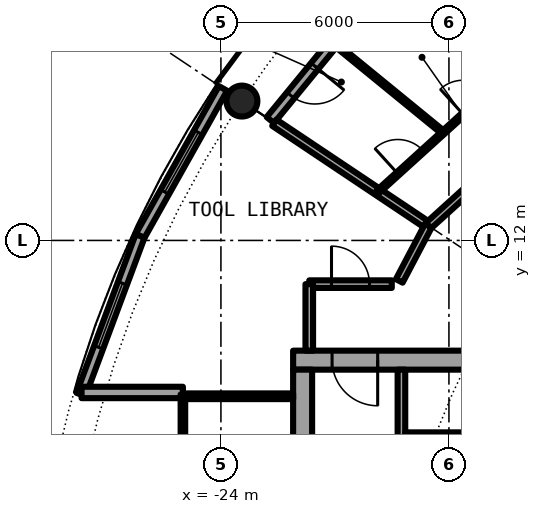
"""IFC4 building model, lengths in metres.
Left out: names, types, materials, properties, quantities, classifications, styles, units other than length and angle.
Written with IfcOpenShell. Run it as: python <this file> out.ifc"""

import sys

from ifc_helpers import new_model, si_unit, direction, frame, frame_2d, origin, origin_2d, place, context, subcontext, project, spatial, rectangle, hollow_circle, extrude, element, fill, save


model = new_model("IFC4")
c1 = context("Model", 3, precision=1e-05, world=origin(), true_north=direction((0.0, 1.0)))
c2 = subcontext(c1, "Body", "Model", "MODEL_VIEW")
j1 = project(units=[si_unit("LENGTHUNIT", "METRE"), si_unit("PLANEANGLEUNIT", "RADIAN")], contexts=[c1])
p1 = place(None, origin())
s1 = spatial("IfcSite", under=j1, at=p1, CompositionType="ELEMENT")
p2 = place(p1, origin())
s2 = spatial("IfcBuilding", under=s1, at=p2, CompositionType="ELEMENT")
p3 = place(p2, frame((0.0, 0.0, 151.3)))
s3 = spatial("IfcBuildingStorey", under=s2, at=p3, CompositionType="ELEMENT", Elevation=151.3)
p4 = place(p3, frame((-23.448, 15.667, 0.0), z_axis=(0.0, 0.0, 1.0), x_axis=(1.0, 0.0, 0.0)))
e1 = element("IfcColumn", 1, at=p4, inside=s3, PredefinedType="COLUMN", context=c2, shape_type="SweptSolid", body=[
    extrude(hollow_circle(Radius=0.406, WallThickness=0.04, at=origin_2d()), origin(), (0.0, 0.0, 1.0), 3.05),
])
p5 = place(p3, frame((-19.304, 19.304, 0.0), z_axis=(0.0, 0.0, 1.0), x_axis=(-0.634382322723, -0.773019449054, 0.0)))
e2 = element("IfcWall", 2, at=p5, inside=s3, PredefinedType="SOLIDWALL", context=c2, shape_type="SweptSolid", body=[
    extrude(rectangle(XDim=5.352, YDim=0.25, at=frame_2d((2.676, 0.0))), origin(), (0.0, 0.0, 1.0), 2.7),
])
p6 = place(p5, frame((0.441, 0.0, 0.3)))
e3 = element("IfcOpeningElement", 3, at=p6, cuts=e2, PredefinedType="OPENING", context=c2, shape_type="SweptSolid", body=[
    extrude(rectangle(XDim=1.8, YDim=2.1, at=frame_2d((0.9, 1.05))), frame((0.0, 0.135, 0.0), z_axis=(0.0, -1.0, 0.0), x_axis=(1.0, 0.0, 0.0)), (0.0, 0.0, 1.0), 0.27),
])
p7 = place(p5, frame((3.51, 0.0, 0.0)))
e4 = element("IfcOpeningElement", 4, at=p7, cuts=e2, PredefinedType="OPENING", context=c2, shape_type="SweptSolid", body=[
    extrude(rectangle(XDim=1.0, YDim=2.2, at=frame_2d((0.5, 1.1))), frame((0.0, 0.135, 0.0), z_axis=(0.0, -1.0, 0.0), x_axis=(1.0, 0.0, 0.0)), (0.0, 0.0, 1.0), 0.27),
])
p8 = place(p3, frame((-23.946, 16.0, 0.0), z_axis=(0.0, 0.0, 1.0), x_axis=(-0.489696356642, -0.871893042919, 0.0)))
e5 = element("IfcWall", 5, at=p8, inside=s3, PredefinedType="SOLIDWALL", context=c2, shape_type="SweptSolid", body=[
    extrude(rectangle(XDim=4.454, YDim=0.25, at=frame_2d((2.227, 0.0))), origin(), (0.0, 0.0, 1.0), 2.7),
])
p9 = place(p8, frame((1.327, 0.0, 0.3)))
e6 = element("IfcOpeningElement", 6, at=p9, cuts=e5, PredefinedType="OPENING", context=c2, shape_type="SweptSolid", body=[
    extrude(rectangle(XDim=1.8, YDim=2.1, at=frame_2d((0.9, 1.05))), frame((0.0, 0.135, 0.0), z_axis=(0.0, -1.0, 0.0), x_axis=(1.0, 0.0, 0.0)), (0.0, 0.0, 1.0), 0.27),
])
p10 = place(p3, frame((-26.127, 12.117, 0.0), z_axis=(0.0, 0.0, 1.0), x_axis=(-0.349247811493, -0.937030397675, 0.0)))
e7 = element("IfcWall", 7, at=p10, inside=s3, PredefinedType="SOLIDWALL", context=c2, shape_type="SweptSolid", body=[
    extrude(rectangle(XDim=4.452, YDim=0.25, at=frame_2d((2.226, 0.0))), origin(), (0.0, 0.0, 1.0), 2.7),
])
p11 = place(p10, frame((1.327, 0.0, 0.3)))
e8 = element("IfcOpeningElement", 8, at=p11, cuts=e7, PredefinedType="OPENING", context=c2, shape_type="SweptSolid", body=[
    extrude(rectangle(XDim=1.8, YDim=2.1, at=frame_2d((0.9, 1.05))), frame((0.0, 0.135, 0.0), z_axis=(0.0, -1.0, 0.0), x_axis=(1.0, 0.0, 0.0)), (0.0, 0.0, 1.0), 0.27),
])
p12 = place(p3, frame((-25.0, 8.0, 0.0), z_axis=(0.0, 0.0, 1.0), x_axis=(-1.0, 0.0, 0.0)))
e9 = element("IfcWall", 9, at=p12, inside=s3, PredefinedType="SOLIDWALL", context=c2, shape_type="SweptSolid", body=[
    extrude(rectangle(XDim=2.667, YDim=0.3, at=frame_2d((1.333, 0.0))), origin(), (0.0, 0.0, 1.0), 2.7),
])
p13 = place(p3, frame((-8.5, 8.85, 0.0), z_axis=(0.0, 0.0, 1.0), x_axis=(-1.0, 0.0, 0.0)))
e10 = element("IfcWall", 10, at=p13, inside=s3, PredefinedType="SHEAR", context=c2, shape_type="SweptSolid", body=[
    extrude(rectangle(XDim=13.6, YDim=0.5, at=frame_2d((6.8, 0.0))), origin(), (0.0, 0.0, 1.0), 3.05),
])
p14 = place(p13, frame((11.375, 0.0, 0.0)))
e11 = element("IfcOpeningElement", 11, at=p14, cuts=e10, PredefinedType="OPENING", context=c2, shape_type="SweptSolid", body=[
    extrude(rectangle(XDim=1.2, YDim=2.3, at=frame_2d((0.6, 1.15))), frame((0.0, 0.26, 0.0), z_axis=(0.0, -1.0, 0.0), x_axis=(1.0, 0.0, 0.0)), (0.0, 0.0, 1.0), 0.52),
])
p15 = place(p3, frame((-21.85, -8.6, 0.0), z_axis=(0.0, 0.0, 1.0), x_axis=(0.0, 1.0, 0.0)))
e12 = element("IfcWall", 12, at=p15, inside=s3, PredefinedType="SHEAR", context=c2, shape_type="SweptSolid", body=[
    extrude(rectangle(XDim=17.2, YDim=0.5, at=frame_2d((8.6, 0.0))), origin(), (0.0, 0.0, 1.0), 3.05),
])
p16 = place(p15, frame((7.7, 0.0, 0.0)))
e13 = element("IfcOpeningElement", 13, at=p16, cuts=e12, PredefinedType="OPENING", context=c2, shape_type="SweptSolid", body=[
    extrude(rectangle(XDim=1.8, YDim=2.3, at=frame_2d((0.9, 1.15))), frame((0.0, 0.26, 0.0), z_axis=(0.0, -1.0, 0.0), x_axis=(1.0, 0.0, 0.0)), (0.0, 0.0, 1.0), 0.52),
])
p17 = place(p3, frame((-19.25, 8.6, 0.0), z_axis=(0.0, 0.0, 1.0), x_axis=(0.0, -1.0, 0.0)))
e14 = element("IfcWall", 14, at=p17, inside=s3, PredefinedType="SOLIDWALL", context=c2, shape_type="SweptSolid", body=[
    extrude(rectangle(XDim=7.025, YDim=0.2, at=frame_2d((3.513, 0.0))), origin(), (0.0, 0.0, 1.0), 2.7),
])
p18 = place(p17, frame((2.35, 0.0, 0.0)))
e15 = element("IfcOpeningElement", 15, at=p18, cuts=e14, PredefinedType="OPENING", context=c2, shape_type="SweptSolid", body=[
    extrude(rectangle(XDim=1.1, YDim=2.3, at=frame_2d((0.55, 1.15))), frame((0.0, 0.11, 0.0), z_axis=(0.0, -1.0, 0.0), x_axis=(1.0, 0.0, 0.0)), (0.0, 0.0, 1.0), 0.22),
])
p19 = place(p3, frame((-15.45, 6.875, 0.0), z_axis=(0.0, 0.0, 1.0), x_axis=(-1.0, 0.0, 0.0)))
e16 = element("IfcWall", 16, at=p19, inside=s3, PredefinedType="PARTITIONING", context=c2, shape_type="SweptSolid", body=[
    extrude(rectangle(XDim=3.7, YDim=0.15, at=frame_2d((1.85, 0.0))), origin(), (0.0, 0.0, 1.0), 2.7),
])
p20 = place(p19, frame((1.4, 0.0, 0.0)))
e17 = element("IfcOpeningElement", 17, at=p20, cuts=e16, PredefinedType="OPENING", context=c2, shape_type="SweptSolid", body=[
    extrude(rectangle(XDim=0.9, YDim=2.3, at=frame_2d((0.45, 1.15))), frame((0.0, 0.085, 0.0), z_axis=(0.0, -1.0, 0.0), x_axis=(1.0, 0.0, 0.0)), (0.0, 0.0, 1.0), 0.17),
])
p21 = place(p3, frame((-22.1, 7.9, 0.0), z_axis=(0.0, 0.0, 1.0), x_axis=(-1.0, 0.0, 0.0)))
e18 = element("IfcWall", 18, at=p21, inside=s3, PredefinedType="PARTITIONING", context=c2, shape_type="SweptSolid", body=[
    extrude(rectangle(XDim=2.84, YDim=0.15, at=frame_2d((1.42, 0.0))), origin(), (0.0, 0.0, 1.0), 2.7),
])
p22 = place(p3, frame((-25.0, 7.95, 0.0), z_axis=(0.0, 0.0, 1.0), x_axis=(0.0, -1.0, 0.0)))
e19 = element("IfcWall", 19, at=p22, inside=s3, PredefinedType="PARTITIONING", context=c2, shape_type="SweptSolid", body=[
    extrude(rectangle(XDim=15.9, YDim=0.12, at=frame_2d((7.95, 0.0))), origin(), (0.0, 0.0, 1.0), 2.7),
])
p23 = place(p22, frame((0.95, 0.0, 0.1)))
e20 = element("IfcOpeningElement", 20, at=p23, cuts=e19, PredefinedType="OPENING", context=c2, shape_type="SweptSolid", body=[
    extrude(rectangle(XDim=14.0, YDim=2.35, at=frame_2d((7.0, 1.175))), frame((0.0, 0.07, 0.0), z_axis=(0.0, -1.0, 0.0), x_axis=(1.0, 0.0, 0.0)), (0.0, 0.0, 1.0), 0.14),
])
p24 = place(p3, frame((-22.595, 15.098, 0.0), z_axis=(0.0, 0.0, 1.0), x_axis=(0.831387096605, -0.55569370664, 0.0)))
e21 = element("IfcWall", 21, at=p24, inside=s3, PredefinedType="PARTITIONING", context=c2, shape_type="SweptSolid", body=[
    extrude(rectangle(XDim=4.875, YDim=0.2, at=frame_2d((2.438, 0.0))), origin(), (0.0, 0.0, 1.0), 2.7),
])
p25 = place(p3, frame((-21.04, 17.199, 0.0), z_axis=(0.0, 0.0, 1.0), x_axis=(0.774321581607, -0.63279229472, 0.0)))
e22 = element("IfcWall", 22, at=p25, inside=s3, PredefinedType="PARTITIONING", context=c2, shape_type="SweptSolid", body=[
    extrude(rectangle(XDim=3.731, YDim=0.1, at=frame_2d((1.866, 0.0))), origin(), (0.0, 0.0, 1.0), 2.7),
])
p26 = place(p3, frame((-19.234, 19.197, 0.0), z_axis=(0.0, 0.0, 1.0), x_axis=(0.707722727509, -0.706490297858, 0.0)))
e23 = element("IfcWall", 23, at=p26, inside=s3, PredefinedType="PARTITIONING", context=c2, shape_type="SweptSolid", body=[
    extrude(rectangle(XDim=3.962, YDim=0.1, at=frame_2d((1.981, 0.0))), origin(), (0.0, 0.0, 1.0), 2.7),
])
p27 = place(p3, frame((-21.675, 10.85, 0.0), z_axis=(0.0, 0.0, 1.0), x_axis=(1.0, 0.0, 0.0)))
e24 = element("IfcWall", 24, at=p27, inside=s3, PredefinedType="PARTITIONING", context=c2, shape_type="SweptSolid", body=[
    extrude(rectangle(XDim=2.171, YDim=0.2, at=frame_2d((1.085, 0.0))), origin(), (0.0, 0.0, 1.0), 2.7),
])
p28 = place(p27, frame((0.585, 0.0, 0.0)))
e25 = element("IfcOpeningElement", 25, at=p28, cuts=e24, PredefinedType="OPENING", context=c2, shape_type="SweptSolid", body=[
    extrude(rectangle(XDim=1.0, YDim=2.3, at=frame_2d((0.5, 1.15))), frame((0.0, 0.11, 0.0), z_axis=(0.0, -1.0, 0.0), x_axis=(1.0, 0.0, 0.0)), (0.0, 0.0, 1.0), 0.22),
])
p29 = place(p3, frame((-18.544, 12.385, 0.0), z_axis=(0.0, 0.0, 1.0), x_axis=(0.740849323054, 0.67167125927, 0.0)))
e26 = element("IfcWall", 26, at=p29, inside=s3, PredefinedType="PARTITIONING", context=c2, shape_type="SweptSolid", body=[
    extrude(rectangle(XDim=10.842, YDim=0.2, at=frame_2d((5.421, 0.0))), origin(), (0.0, 0.0, 1.0), 2.7),
])
p30 = place(p29, frame((3.839, 0.0, 0.0)))
e27 = element("IfcOpeningElement", 27, at=p30, cuts=e26, PredefinedType="OPENING", context=c2, shape_type="SweptSolid", body=[
    extrude(rectangle(XDim=1.0, YDim=2.3, at=frame_2d((0.5, 1.15))), frame((0.0, 0.11, 0.0), z_axis=(0.0, -1.0, 0.0), x_axis=(1.0, 0.0, 0.0)), (0.0, 0.0, 1.0), 0.22),
])
p31 = place(p3, frame((-21.675, 9.1, 0.0), z_axis=(0.0, 0.0, 1.0), x_axis=(0.0, 1.0, 0.0)))
e28 = element("IfcWall", 28, at=p31, inside=s3, PredefinedType="PARTITIONING", context=c2, shape_type="SweptSolid", body=[
    extrude(rectangle(XDim=1.75, YDim=0.2, at=frame_2d((0.875, 0.0))), origin(), (0.0, 0.0, 1.0), 2.7),
])
p32 = place(p3, frame((-19.307, 10.935, 0.0), z_axis=(0.0, 0.0, 1.0), x_axis=(0.465605550524, 0.884992356646, 0.0)))
e29 = element("IfcWall", 29, at=p32, inside=s3, PredefinedType="PARTITIONING", context=c2, shape_type="SweptSolid", body=[
    extrude(rectangle(XDim=1.643, YDim=0.2, at=frame_2d((0.821, 0.0))), origin(), (0.0, 0.0, 1.0), 2.7),
])
p33 = place(p3, frame((-19.872, 13.278, 0.0), z_axis=(0.0, 0.0, 1.0), x_axis=(0.740923753351, 0.671589153962, 0.0)))
e30 = element("IfcWall", 30, at=p33, inside=s3, PredefinedType="PARTITIONING", context=c2, shape_type="SweptSolid", body=[
    extrude(rectangle(XDim=6.969, YDim=0.1, at=frame_2d((3.484, 0.0))), origin(), (0.0, 0.0, 1.0), 2.7),
])
p34 = place(p33, frame((3.034, 0.0, 0.0)))
e31 = element("IfcOpeningElement", 31, at=p34, cuts=e30, PredefinedType="OPENING", context=c2, shape_type="SweptSolid", body=[
    extrude(rectangle(XDim=0.9, YDim=2.3, at=frame_2d((0.45, 1.15))), frame((0.0, 0.06, 0.0), z_axis=(0.0, -1.0, 0.0), x_axis=(1.0, 0.0, 0.0)), (0.0, 0.0, 1.0), 0.12),
])
p35 = place(p33, frame((0.711, 0.0, 0.0)))
e32 = element("IfcOpeningElement", 32, at=p35, cuts=e30, PredefinedType="OPENING", context=c2, shape_type="SweptSolid", body=[
    extrude(rectangle(XDim=0.9, YDim=2.3, at=frame_2d((0.45, 1.15))), frame((0.0, 0.06, 0.0), z_axis=(0.0, -1.0, 0.0), x_axis=(1.0, 0.0, 0.0)), (0.0, 0.0, 1.0), 0.12),
])
p36 = place(p7, origin())
e33 = element("IfcDoor", 33, at=p36, inside=s3, OperationType="SINGLE_SWING_LEFT", PredefinedType="DOOR", context=c2, shape_type="SweptSolid", body=[
    extrude(rectangle(XDim=1.0, YDim=2.2, at=frame_2d((0.5, 1.1))), frame((0.0, 0.025, 0.0), z_axis=(0.0, -1.0, 0.0), x_axis=(1.0, 0.0, 0.0)), (0.0, 0.0, 1.0), 0.05),
])
fill(e4, e33)
p37 = place(p9, origin())
e34 = element("IfcWindow", 34, at=p37, inside=s3, PartitioningType="SINGLE_PANEL", PredefinedType="WINDOW", context=c2, shape_type="SweptSolid", body=[
    extrude(rectangle(XDim=1.8, YDim=2.1, at=frame_2d((0.9, 1.05))), frame((0.0, 0.03, 0.0), z_axis=(0.0, -1.0, 0.0), x_axis=(1.0, 0.0, 0.0)), (0.0, 0.0, 1.0), 0.06),
])
fill(e6, e34)
p38 = place(p11, origin())
e35 = element("IfcWindow", 35, at=p38, inside=s3, PartitioningType="SINGLE_PANEL", PredefinedType="WINDOW", context=c2, shape_type="SweptSolid", body=[
    extrude(rectangle(XDim=1.8, YDim=2.1, at=frame_2d((0.9, 1.05))), frame((0.0, 0.03, 0.0), z_axis=(0.0, -1.0, 0.0), x_axis=(1.0, 0.0, 0.0)), (0.0, 0.0, 1.0), 0.06),
])
fill(e8, e35)
p39 = place(p20, origin())
e36 = element("IfcDoor", 36, at=p39, inside=s3, OperationType="SINGLE_SWING_LEFT", PredefinedType="DOOR", context=c2, shape_type="SweptSolid", body=[
    extrude(rectangle(XDim=0.9, YDim=2.3, at=frame_2d((0.45, 1.15))), frame((0.0, 0.025, 0.0), z_axis=(0.0, -1.0, 0.0), x_axis=(1.0, 0.0, 0.0)), (0.0, 0.0, 1.0), 0.05),
])
fill(e17, e36)
p40 = place(p14, origin())
e37 = element("IfcDoor", 37, at=p40, inside=s3, OperationType="SINGLE_SWING_LEFT", PredefinedType="DOOR", context=c2, shape_type="SweptSolid", body=[
    extrude(rectangle(XDim=1.2, YDim=2.3, at=frame_2d((0.6, 1.15))), frame((0.0, 0.025, 0.0), z_axis=(0.0, -1.0, 0.0), x_axis=(1.0, 0.0, 0.0)), (0.0, 0.0, 1.0), 0.05),
])
fill(e11, e37)
p41 = place(p23, origin())
e38 = element("IfcWindow", 38, at=p41, inside=s3, PartitioningType="SINGLE_PANEL", PredefinedType="WINDOW", context=c2, shape_type="SweptSolid", body=[
    extrude(rectangle(XDim=14.0, YDim=2.35, at=frame_2d((7.0, 1.175))), frame((0.0, 0.03, 0.0), z_axis=(0.0, -1.0, 0.0), x_axis=(1.0, 0.0, 0.0)), (0.0, 0.0, 1.0), 0.06),
])
fill(e20, e38)
p42 = place(p35, origin())
e39 = element("IfcDoor", 39, at=p42, inside=s3, OperationType="SINGLE_SWING_LEFT", PredefinedType="DOOR", context=c2, shape_type="SweptSolid", body=[
    extrude(rectangle(XDim=0.9, YDim=2.3, at=frame_2d((0.45, 1.15))), frame((0.0, 0.025, 0.0), z_axis=(0.0, -1.0, 0.0), x_axis=(1.0, 0.0, 0.0)), (0.0, 0.0, 1.0), 0.05),
])
fill(e32, e39)
p43 = place(p28, origin())
e40 = element("IfcDoor", 40, at=p43, inside=s3, OperationType="SINGLE_SWING_LEFT", PredefinedType="DOOR", context=c2, shape_type="SweptSolid", body=[
    extrude(rectangle(XDim=1.0, YDim=2.3, at=frame_2d((0.5, 1.15))), frame((0.0, 0.025, 0.0), z_axis=(0.0, -1.0, 0.0), x_axis=(1.0, 0.0, 0.0)), (0.0, 0.0, 1.0), 0.05),
])
fill(e25, e40)
save(model, sys.argv[1])
